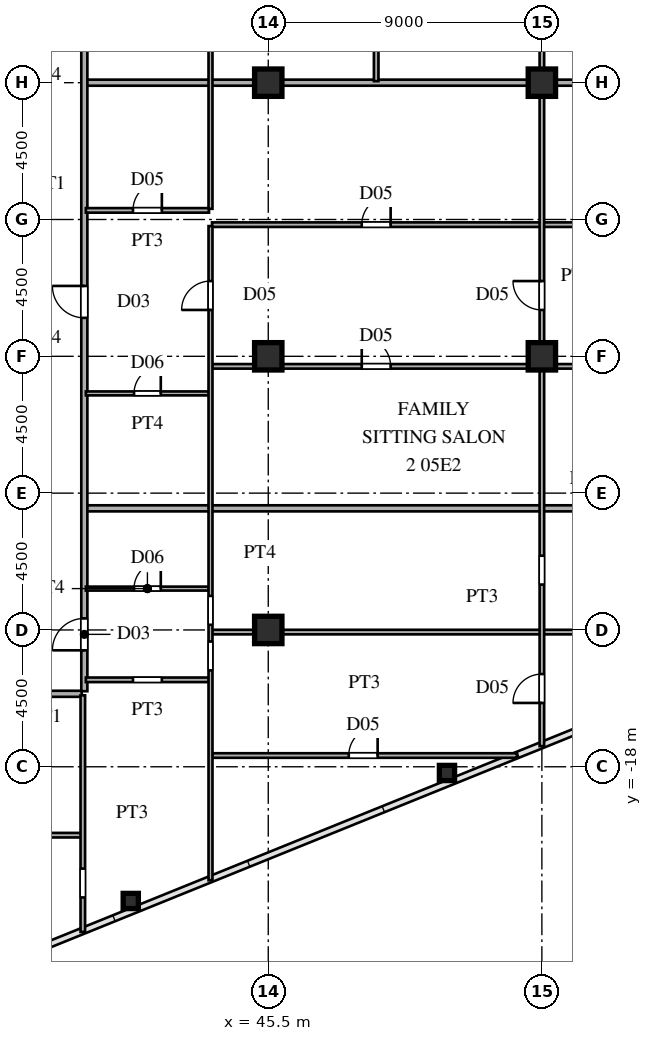
"""IFC4 building model, lengths in metres.
Left out: names, types, materials, properties, quantities, classifications, styles, units other than length and angle.
Written with IfcOpenShell. Run it as: python <this file> out.ifc"""

import sys

from ifc_helpers import new_model, si_unit, direction, frame, frame_2d, origin, origin_2d, place, context, subcontext, project, spatial, rectangle, hollow_rectangle, i_section, extrude, source, transform, mapped, element, fill, save


model = new_model("IFC4")
c1 = context("Model", 3, precision=1e-05, world=origin(), true_north=direction((0.0, 1.0)))
c2 = subcontext(c1, "Body", "Model", "MODEL_VIEW")
j1 = project(units=[si_unit("LENGTHUNIT", "METRE"), si_unit("PLANEANGLEUNIT", "RADIAN")], contexts=[c1])
p1 = place(None, origin())
s1 = spatial("IfcSite", under=j1, at=p1, CompositionType="ELEMENT")
p2 = place(p1, origin())
s2 = spatial("IfcBuilding", under=s1, at=p2, CompositionType="ELEMENT")
p3 = place(p2, frame((0.0, 0.0, 22.5)))
s3 = spatial("IfcBuildingStorey", under=s2, at=p3, CompositionType="ELEMENT", Elevation=22.5)
m1 = source(origin(), c2, "Body", "SweptSolid", [
    extrude(i_section(OverallWidth=0.9, OverallDepth=0.9, WebThickness=0.036, FlangeThickness=0.055, at=origin_2d()), origin(), (0.0, 0.0, 1.0), 3.6),
])
for number, where, z_axis, x_axis in (
    (1, (45.5, -13.5, 0.0), (0.0, 0.0, 1.0), (1.0, 0.0, 0.0)),
    (2, (45.5, -4.5, 0.0), (0.0, 0.0, 1.0), (1.0, 0.0, 0.0)),
    (3, (45.5, 4.5, 0.0), (0.0, 0.0, 1.0), (1.0, 0.0, 0.0)),
    (4, (54.5, -4.5, 0.0), (0.0, 0.0, 1.0), (1.0, 0.0, 0.0)),
    (5, (54.5, 4.5, 0.0), (0.0, 0.0, 1.0), (1.0, 0.0, 0.0)),
):
    element("IfcColumn", number, at=place(p3, frame(where, z_axis=z_axis, x_axis=x_axis)), inside=s3, PredefinedType="COLUMN", context=c2, shape_type="MappedRepresentation", body=[
        mapped(m1, transform((0.0, 0.0, 0.0), scale=1.0)),
    ])
m2 = source(origin(), c2, "Body", "SweptSolid", [
    extrude(hollow_rectangle(XDim=0.5, YDim=0.5, WallThickness=0.02, at=origin_2d()), origin(), (0.0, 0.0, 1.0), 3.6),
])
for number, where, z_axis, x_axis in (
    (6, (40.977, -22.414, 0.0), (0.0, 0.0, 1.0), (1.0, 0.0, 0.0)),
    (7, (51.378, -18.204, 0.0), (0.0, 0.0, 1.0), (1.0, 0.0, 0.0)),
):
    element("IfcColumn", number, at=place(p3, frame(where, z_axis=z_axis, x_axis=x_axis)), inside=s3, PredefinedType="COLUMN", context=c2, shape_type="MappedRepresentation", body=[
        mapped(m2, transform((0.0, 0.0, 0.0), scale=1.0)),
    ])
p4 = place(p3, frame((27.465, -20.25, 0.0), z_axis=(0.0, 0.0, 1.0), x_axis=(1.0, 0.0, 0.0)))
e8 = element("IfcWall", 8, at=p4, inside=s3, PredefinedType="PARTITIONING", context=c2, shape_type="SweptSolid", body=[
    extrude(rectangle(XDim=11.885, YDim=0.15, at=frame_2d((5.942, 0.0))), origin(), (0.0, 0.0, 1.0), 3.38),
])
p5 = place(p4, frame((5.51, 0.0, 0.0)))
e9 = element("IfcOpeningElement", 9, at=p5, cuts=e8, PredefinedType="OPENING", context=c2, shape_type="SweptSolid", body=[
    extrude(rectangle(XDim=0.95, YDim=2.15, at=frame_2d((0.475, 1.075))), frame((0.0, 0.085, 0.0), z_axis=(0.0, -1.0, 0.0), x_axis=(1.0, 0.0, 0.0)), (0.0, 0.0, 1.0), 0.17),
])
p6 = place(p3, frame((43.65, -17.63, 0.0), z_axis=(0.0, 0.0, 1.0), x_axis=(1.0, 0.0, 0.0)))
e10 = element("IfcWall", 10, at=p6, inside=s3, PredefinedType="PARTITIONING", context=c2, shape_type="SweptSolid", body=[
    extrude(rectangle(XDim=10.03, YDim=0.15, at=frame_2d((5.015, 0.0))), origin(), (0.0, 0.0, 1.0), 3.38),
])
p7 = place(p6, frame((4.498, 0.0, 0.0)))
e11 = element("IfcOpeningElement", 11, at=p7, cuts=e10, PredefinedType="OPENING", context=c2, shape_type="SweptSolid", body=[
    extrude(rectangle(XDim=0.95, YDim=2.15, at=frame_2d((0.475, 1.075))), frame((0.0, 0.085, 0.0), z_axis=(0.0, -1.0, 0.0), x_axis=(1.0, 0.0, 0.0)), (0.0, 0.0, 1.0), 0.17),
])
p8 = place(p3, frame((36.585, -15.6, 0.0), z_axis=(0.0, 0.0, 1.0), x_axis=(1.0, 0.0, 0.0)))
e12 = element("IfcWall", 12, at=p8, inside=s3, PredefinedType="PARTITIONING", context=c2, shape_type="SweptSolid", body=[
    extrude(rectangle(XDim=2.78, YDim=0.2, at=frame_2d((1.39, 0.0))), origin(), (0.0, 0.0, 1.0), 3.38),
])
p9 = place(p3, frame((39.5, -15.14, 0.0), z_axis=(0.0, 0.0, 1.0), x_axis=(1.0, 0.0, 0.0)))
e13 = element("IfcWall", 13, at=p9, inside=s3, PredefinedType="PARTITIONING", context=c2, shape_type="SweptSolid", body=[
    extrude(rectangle(XDim=4.05, YDim=0.15, at=frame_2d((2.025, 0.0))), origin(), (0.0, 0.0, 1.0), 3.38),
])
p10 = place(p9, frame((1.55, 0.0, 0.0)))
e14 = element("IfcOpeningElement", 14, at=p10, cuts=e13, PredefinedType="OPENING", context=c2, shape_type="SweptSolid", body=[
    extrude(rectangle(XDim=0.95, YDim=2.15, at=frame_2d((0.475, 1.075))), frame((0.0, 0.085, 0.0), z_axis=(0.0, -1.0, 0.0), x_axis=(1.0, 0.0, 0.0)), (0.0, 0.0, 1.0), 0.17),
])
p11 = place(p3, frame((43.65, -13.57, 0.0), z_axis=(0.0, 0.0, 1.0), x_axis=(1.0, 0.0, 0.0)))
e15 = element("IfcWall", 15, at=p11, inside=s3, PredefinedType="PARTITIONING", context=c2, shape_type="SweptSolid", body=[
    extrude(rectangle(XDim=20.075, YDim=0.15, at=frame_2d((10.038, 0.0))), origin(), (0.0, 0.0, 1.0), 2.68),
])
p12 = place(p3, frame((39.5, -12.14, 0.0), z_axis=(0.0, 0.0, 1.0), x_axis=(1.0, 0.0, 0.0)))
e16 = element("IfcWall", 16, at=p12, inside=s3, PredefinedType="PARTITIONING", context=c2, shape_type="SweptSolid", body=[
    extrude(rectangle(XDim=4.05, YDim=0.13, at=frame_2d((2.025, 0.0))), origin(), (0.0, 0.0, 1.0), 3.38),
])
p13 = place(p12, frame((1.585, 0.0, 0.0)))
e17 = element("IfcOpeningElement", 17, at=p13, cuts=e16, PredefinedType="OPENING", context=c2, shape_type="SweptSolid", body=[
    extrude(rectangle(XDim=0.88, YDim=2.1, at=frame_2d((0.44, 1.05))), frame((0.0, 0.075, 0.0), z_axis=(0.0, -1.0, 0.0), x_axis=(1.0, 0.0, 0.0)), (0.0, 0.0, 1.0), 0.15),
])
p14 = place(p3, frame((39.53, -9.5, 0.0), z_axis=(0.0, 0.0, 1.0), x_axis=(1.0, 0.0, 0.0)))
e18 = element("IfcWall", 18, at=p14, inside=s3, PredefinedType="PARTITIONING", context=c2, shape_type="SweptSolid", body=[
    extrude(rectangle(XDim=32.845, YDim=0.2, at=frame_2d((16.422, 0.0))), origin(), (0.0, 0.0, 1.0), 3.38),
])
p15 = place(p3, frame((39.5, -5.72, 0.0), z_axis=(0.0, 0.0, 1.0), x_axis=(1.0, 0.0, 0.0)))
e19 = element("IfcWall", 19, at=p15, inside=s3, PredefinedType="PARTITIONING", context=c2, shape_type="SweptSolid", body=[
    extrude(rectangle(XDim=4.05, YDim=0.13, at=frame_2d((2.025, 0.0))), origin(), (0.0, 0.0, 1.0), 3.38),
])
p16 = place(p15, frame((1.585, 0.0, 0.0)))
e20 = element("IfcOpeningElement", 20, at=p16, cuts=e19, PredefinedType="OPENING", context=c2, shape_type="SweptSolid", body=[
    extrude(rectangle(XDim=0.88, YDim=2.1, at=frame_2d((0.44, 1.05))), frame((0.0, 0.075, 0.0), z_axis=(0.0, -1.0, 0.0), x_axis=(1.0, 0.0, 0.0)), (0.0, 0.0, 1.0), 0.15),
])
p17 = place(p3, frame((43.65, -4.83, 0.0), z_axis=(0.0, 0.0, 1.0), x_axis=(1.0, 0.0, 0.0)))
e21 = element("IfcWall", 21, at=p17, inside=s3, PredefinedType="PARTITIONING", context=c2, shape_type="SweptSolid", body=[
    extrude(rectangle(XDim=28.885, YDim=0.15, at=frame_2d((14.442, 0.0))), origin(), (0.0, 0.0, 1.0), 3.38),
])
p18 = place(p17, frame((4.925, 0.0, 0.0)))
e22 = element("IfcOpeningElement", 22, at=p18, cuts=e21, PredefinedType="OPENING", context=c2, shape_type="SweptSolid", body=[
    extrude(rectangle(XDim=0.95, YDim=2.15, at=frame_2d((0.475, 1.075))), frame((0.0, 0.085, 0.0), z_axis=(0.0, -1.0, 0.0), x_axis=(1.0, 0.0, 0.0)), (0.0, 0.0, 1.0), 0.17),
])
p19 = place(p17, frame((13.225, 0.0, 0.0)))
e23 = element("IfcOpeningElement", 23, at=p19, cuts=e21, PredefinedType="OPENING", context=c2, shape_type="SweptSolid", body=[
    extrude(rectangle(XDim=0.95, YDim=2.15, at=frame_2d((0.475, 1.075))), frame((0.0, 0.085, 0.0), z_axis=(0.0, -1.0, 0.0), x_axis=(1.0, 0.0, 0.0)), (0.0, 0.0, 1.0), 0.17),
])
p20 = place(p3, frame((43.65, -0.17, 0.0), z_axis=(0.0, 0.0, 1.0), x_axis=(1.0, 0.0, 0.0)))
e24 = element("IfcWall", 24, at=p20, inside=s3, PredefinedType="PARTITIONING", context=c2, shape_type="SweptSolid", body=[
    extrude(rectangle(XDim=28.885, YDim=0.15, at=frame_2d((14.442, 0.0))), origin(), (0.0, 0.0, 1.0), 3.38),
])
p21 = place(p20, frame((4.925, 0.0, 0.0)))
e25 = element("IfcOpeningElement", 25, at=p21, cuts=e24, PredefinedType="OPENING", context=c2, shape_type="SweptSolid", body=[
    extrude(rectangle(XDim=0.95, YDim=2.15, at=frame_2d((0.475, 1.075))), frame((0.0, 0.085, 0.0), z_axis=(0.0, -1.0, 0.0), x_axis=(1.0, 0.0, 0.0)), (0.0, 0.0, 1.0), 0.17),
])
p22 = place(p20, frame((13.225, 0.0, 0.0)))
e26 = element("IfcOpeningElement", 26, at=p22, cuts=e24, PredefinedType="OPENING", context=c2, shape_type="SweptSolid", body=[
    extrude(rectangle(XDim=0.95, YDim=2.15, at=frame_2d((0.475, 1.075))), frame((0.0, 0.085, 0.0), z_axis=(0.0, -1.0, 0.0), x_axis=(1.0, 0.0, 0.0)), (0.0, 0.0, 1.0), 0.17),
])
p23 = place(p3, frame((39.5, 0.3, 0.0), z_axis=(0.0, 0.0, 1.0), x_axis=(1.0, 0.0, 0.0)))
e27 = element("IfcWall", 27, at=p23, inside=s3, PredefinedType="PARTITIONING", context=c2, shape_type="SweptSolid", body=[
    extrude(rectangle(XDim=4.05, YDim=0.15, at=frame_2d((2.025, 0.0))), origin(), (0.0, 0.0, 1.0), 3.38),
])
p24 = place(p23, frame((1.55, 0.0, 0.0)))
e28 = element("IfcOpeningElement", 28, at=p24, cuts=e27, PredefinedType="OPENING", context=c2, shape_type="SweptSolid", body=[
    extrude(rectangle(XDim=0.95, YDim=2.15, at=frame_2d((0.475, 1.075))), frame((0.0, 0.085, 0.0), z_axis=(0.0, -1.0, 0.0), x_axis=(1.0, 0.0, 0.0)), (0.0, 0.0, 1.0), 0.17),
])
p25 = place(p3, frame((39.53, 4.5, 0.0), z_axis=(0.0, 0.0, 1.0), x_axis=(1.0, 0.0, 0.0)))
e29 = element("IfcWall", 29, at=p25, inside=s3, PredefinedType="PARTITIONING", context=c2, shape_type="SweptSolid", body=[
    extrude(rectangle(XDim=14.99, YDim=0.2, at=frame_2d((7.495, 0.0))), origin(), (0.0, 0.0, 1.0), 2.68),
])
p26 = place(p3, frame((54.52, 4.5, 0.0), z_axis=(0.0, 0.0, 1.0), x_axis=(1.0, 0.0, 0.0)))
e30 = element("IfcWall", 30, at=p26, inside=s3, PredefinedType="PARTITIONING", context=c2, shape_type="SweptSolid", body=[
    extrude(rectangle(XDim=17.985, YDim=0.2, at=frame_2d((8.992, 0.0))), origin(), (0.0, 0.0, 1.0), 3.38),
])
p27 = place(p3, frame((39.4, -23.433, 0.0), z_axis=(0.0, 0.0, 1.0), x_axis=(0.0, 1.0, 0.0)))
e31 = element("IfcWall", 31, at=p27, inside=s3, PredefinedType="PARTITIONING", context=c2, shape_type="SweptSolid", body=[
    extrude(rectangle(XDim=7.783, YDim=0.15, at=frame_2d((3.892, 0.0))), origin(), (0.0, 0.0, 1.0), 3.38),
])
p28 = place(p27, frame((1.134, 0.0, 0.0)))
e32 = element("IfcOpeningElement", 32, at=p28, cuts=e31, PredefinedType="OPENING", context=c2, shape_type="SweptSolid", body=[
    extrude(rectangle(XDim=0.95, YDim=2.15, at=frame_2d((0.475, 1.075))), frame((0.0, 0.085, 0.0), z_axis=(0.0, -1.0, 0.0), x_axis=(1.0, 0.0, 0.0)), (0.0, 0.0, 1.0), 0.17),
])
p29 = place(p3, frame((39.45, -15.515, 0.0), z_axis=(0.0, 0.0, 1.0), x_axis=(0.0, 1.0, 0.0)))
e33 = element("IfcWall", 33, at=p29, inside=s3, PredefinedType="PARTITIONING", context=c2, shape_type="SweptSolid", body=[
    extrude(rectangle(XDim=31.03, YDim=0.2, at=frame_2d((15.515, 0.0))), origin(), (0.0, 0.0, 1.0), 3.38),
])
p30 = place(p29, frame((1.345, 0.0, 0.0)))
e34 = element("IfcOpeningElement", 34, at=p30, cuts=e33, PredefinedType="OPENING", context=c2, shape_type="SweptSolid", body=[
    extrude(rectangle(XDim=1.05, YDim=2.25, at=frame_2d((0.525, 1.125))), frame((0.0, 0.11, 0.0), z_axis=(0.0, -1.0, 0.0), x_axis=(1.0, 0.0, 0.0)), (0.0, 0.0, 1.0), 0.22),
])
p31 = place(p29, frame((12.28, 0.0, 0.0)))
e35 = element("IfcOpeningElement", 35, at=p31, cuts=e33, PredefinedType="OPENING", context=c2, shape_type="SweptSolid", body=[
    extrude(rectangle(XDim=1.05, YDim=2.25, at=frame_2d((0.525, 1.125))), frame((0.0, 0.11, 0.0), z_axis=(0.0, -1.0, 0.0), x_axis=(1.0, 0.0, 0.0)), (0.0, 0.0, 1.0), 0.22),
])
p32 = place(p29, frame((25.067, 0.0, 0.0)))
e36 = element("IfcOpeningElement", 36, at=p32, cuts=e33, PredefinedType="OPENING", context=c2, shape_type="SweptSolid", body=[
    extrude(rectangle(XDim=1.05, YDim=2.25, at=frame_2d((0.525, 1.125))), frame((0.0, 0.11, 0.0), z_axis=(0.0, -1.0, 0.0), x_axis=(1.0, 0.0, 0.0)), (0.0, 0.0, 1.0), 0.22),
])
p33 = place(p3, frame((43.6, -21.733, 0.0), z_axis=(0.0, 0.0, 1.0), x_axis=(0.0, 1.0, 0.0)))
e37 = element("IfcWall", 37, at=p33, inside=s3, PredefinedType="PARTITIONING", context=c2, shape_type="SweptSolid", body=[
    extrude(rectangle(XDim=21.516, YDim=0.13, at=frame_2d((10.758, 0.0))), origin(), (0.0, 0.0, 1.0), 3.38),
])
p34 = place(p33, frame((6.903, 0.0, 0.0)))
e38 = element("IfcOpeningElement", 38, at=p34, cuts=e37, PredefinedType="OPENING", context=c2, shape_type="SweptSolid", body=[
    extrude(rectangle(XDim=0.95, YDim=2.15, at=frame_2d((0.475, 1.075))), frame((0.0, 0.075, 0.0), z_axis=(0.0, -1.0, 0.0), x_axis=(1.0, 0.0, 0.0)), (0.0, 0.0, 1.0), 0.15),
])
p35 = place(p33, frame((8.403, 0.0, 0.0)))
e39 = element("IfcOpeningElement", 39, at=p35, cuts=e37, PredefinedType="OPENING", context=c2, shape_type="SweptSolid", body=[
    extrude(rectangle(XDim=0.95, YDim=2.15, at=frame_2d((0.475, 1.075))), frame((0.0, 0.075, 0.0), z_axis=(0.0, -1.0, 0.0), x_axis=(1.0, 0.0, 0.0)), (0.0, 0.0, 1.0), 0.15),
])
p36 = place(p33, frame((18.758, 0.0, 0.0)))
e40 = element("IfcOpeningElement", 40, at=p36, cuts=e37, PredefinedType="OPENING", context=c2, shape_type="SweptSolid", body=[
    extrude(rectangle(XDim=0.95, YDim=2.15, at=frame_2d((0.475, 1.075))), frame((0.0, 0.075, 0.0), z_axis=(0.0, -1.0, 0.0), x_axis=(1.0, 0.0, 0.0)), (0.0, 0.0, 1.0), 0.15),
])
p37 = place(p3, frame((43.6, 0.352, 0.0), z_axis=(0.0, 0.0, 1.0), x_axis=(0.0, 1.0, 0.0)))
e41 = element("IfcWall", 41, at=p37, inside=s3, PredefinedType="PARTITIONING", context=c2, shape_type="SweptSolid", body=[
    extrude(rectangle(XDim=21.381, YDim=0.13, at=frame_2d((10.69, 0.0))), origin(), (0.0, 0.0, 1.0), 3.38),
])
p38 = place(p37, frame((8.578, 0.0, 0.0)))
e42 = element("IfcOpeningElement", 42, at=p38, cuts=e41, PredefinedType="OPENING", context=c2, shape_type="SweptSolid", body=[
    extrude(rectangle(XDim=0.95, YDim=2.15, at=frame_2d((0.475, 1.075))), frame((0.0, 0.075, 0.0), z_axis=(0.0, -1.0, 0.0), x_axis=(1.0, 0.0, 0.0)), (0.0, 0.0, 1.0), 0.15),
])
p39 = place(p37, frame((10.078, 0.0, 0.0)))
e43 = element("IfcOpeningElement", 43, at=p39, cuts=e41, PredefinedType="OPENING", context=c2, shape_type="SweptSolid", body=[
    extrude(rectangle(XDim=0.95, YDim=2.15, at=frame_2d((0.475, 1.075))), frame((0.0, 0.075, 0.0), z_axis=(0.0, -1.0, 0.0), x_axis=(1.0, 0.0, 0.0)), (0.0, 0.0, 1.0), 0.15),
])
p40 = place(p3, frame((49.05, 4.55, 0.0), z_axis=(0.0, 0.0, 1.0), x_axis=(0.0, 1.0, 0.0)))
e44 = element("IfcWall", 44, at=p40, inside=s3, PredefinedType="PARTITIONING", context=c2, shape_type="SweptSolid", body=[
    extrude(rectangle(XDim=11.365, YDim=0.15, at=frame_2d((5.683, 0.0))), origin(), (0.0, 0.0, 1.0), 3.38),
])
p41 = place(p40, frame((2.341, 0.0, 0.0)))
e45 = element("IfcOpeningElement", 45, at=p41, cuts=e44, PredefinedType="OPENING", context=c2, shape_type="SweptSolid", body=[
    extrude(rectangle(XDim=0.95, YDim=2.15, at=frame_2d((0.475, 1.075))), frame((0.0, 0.085, 0.0), z_axis=(0.0, -1.0, 0.0), x_axis=(1.0, 0.0, 0.0)), (0.0, 0.0, 1.0), 0.17),
])
p42 = place(p3, frame((54.5, -17.321, 0.0), z_axis=(0.0, 0.0, 1.0), x_axis=(0.0, 1.0, 0.0)))
e46 = element("IfcWall", 46, at=p42, inside=s3, PredefinedType="PARTITIONING", context=c2, shape_type="SweptSolid", body=[
    extrude(rectangle(XDim=33.236, YDim=0.15, at=frame_2d((16.618, 0.0))), origin(), (0.0, 0.0, 1.0), 2.68),
])
p43 = place(p42, frame((1.42, 0.0, 0.0)))
e47 = element("IfcOpeningElement", 47, at=p43, cuts=e46, PredefinedType="OPENING", context=c2, shape_type="SweptSolid", body=[
    extrude(rectangle(XDim=0.95, YDim=2.15, at=frame_2d((0.475, 1.075))), frame((0.0, 0.085, 0.0), z_axis=(0.0, -1.0, 0.0), x_axis=(1.0, 0.0, 0.0)), (0.0, 0.0, 1.0), 0.17),
])
p44 = place(p42, frame((5.313, 0.0, 0.0)))
e48 = element("IfcOpeningElement", 48, at=p44, cuts=e46, PredefinedType="OPENING", context=c2, shape_type="SweptSolid", body=[
    extrude(rectangle(XDim=0.95, YDim=2.15, at=frame_2d((0.475, 1.075))), frame((0.0, 0.085, 0.0), z_axis=(0.0, -1.0, 0.0), x_axis=(1.0, 0.0, 0.0)), (0.0, 0.0, 1.0), 0.17),
])
p45 = place(p42, frame((14.346, 0.0, 0.0)))
e49 = element("IfcOpeningElement", 49, at=p45, cuts=e46, PredefinedType="OPENING", context=c2, shape_type="SweptSolid", body=[
    extrude(rectangle(XDim=0.95, YDim=2.15, at=frame_2d((0.475, 1.075))), frame((0.0, 0.085, 0.0), z_axis=(0.0, -1.0, 0.0), x_axis=(1.0, 0.0, 0.0)), (0.0, 0.0, 1.0), 0.17),
])
p46 = place(p42, frame((24.212, 0.0, 0.0)))
e50 = element("IfcOpeningElement", 50, at=p46, cuts=e46, PredefinedType="OPENING", context=c2, shape_type="SweptSolid", body=[
    extrude(rectangle(XDim=0.95, YDim=2.15, at=frame_2d((0.475, 1.075))), frame((0.0, 0.085, 0.0), z_axis=(0.0, -1.0, 0.0), x_axis=(1.0, 0.0, 0.0)), (0.0, 0.0, 1.0), 0.17),
])
m3 = source(origin(), c2, "Body", "SweptSolid", [
    extrude(rectangle(XDim=0.95, YDim=2.15, at=frame_2d((0.475, 1.075))), frame((0.0, 0.025, 0.0), z_axis=(0.0, -1.0, 0.0), x_axis=(1.0, 0.0, 0.0)), (0.0, 0.0, 1.0), 0.05),
])
p47 = place(p7, origin())
e51 = element("IfcDoor", 51, at=p47, inside=s3, OperationType="SINGLE_SWING_RIGHT", PredefinedType="DOOR", context=c2, shape_type="MappedRepresentation", body=[
    mapped(m3, transform((0.0, 0.0, 0.0), scale=1.0)),
])
fill(e11, e51)
m4 = source(origin(), c2, "Body", "SweptSolid", [
    extrude(rectangle(XDim=0.88, YDim=2.1, at=frame_2d((0.44, 1.05))), frame((0.0, 0.025, 0.0), z_axis=(0.0, -1.0, 0.0), x_axis=(1.0, 0.0, 0.0)), (0.0, 0.0, 1.0), 0.05),
])
p48 = place(p13, origin())
e52 = element("IfcDoor", 52, at=p48, inside=s3, OperationType="SINGLE_SWING_RIGHT", PredefinedType="DOOR", context=c2, shape_type="MappedRepresentation", body=[
    mapped(m4, transform((0.0, 0.0, 0.0), scale=1.0)),
])
fill(e17, e52)
p49 = place(p16, origin())
e53 = element("IfcDoor", 53, at=p49, inside=s3, OperationType="SINGLE_SWING_RIGHT", PredefinedType="DOOR", context=c2, shape_type="MappedRepresentation", body=[
    mapped(m4, transform((0.0, 0.0, 0.0), scale=1.0)),
])
fill(e20, e53)
p50 = place(p18, origin())
e54 = element("IfcDoor", 54, at=p50, inside=s3, OperationType="SINGLE_SWING_LEFT", PredefinedType="DOOR", context=c2, shape_type="MappedRepresentation", body=[
    mapped(m3, transform((0.0, 0.0, 0.0), scale=1.0)),
])
fill(e22, e54)
p51 = place(p21, origin())
e55 = element("IfcDoor", 55, at=p51, inside=s3, OperationType="SINGLE_SWING_RIGHT", PredefinedType="DOOR", context=c2, shape_type="MappedRepresentation", body=[
    mapped(m3, transform((0.0, 0.0, 0.0), scale=1.0)),
])
fill(e25, e55)
p52 = place(p24, origin())
e56 = element("IfcDoor", 56, at=p52, inside=s3, OperationType="SINGLE_SWING_RIGHT", PredefinedType="DOOR", context=c2, shape_type="MappedRepresentation", body=[
    mapped(m3, transform((0.0, 0.0, 0.0), scale=1.0)),
])
fill(e28, e56)
m5 = source(origin(), c2, "Body", "SweptSolid", [
    extrude(rectangle(XDim=1.05, YDim=2.25, at=frame_2d((0.525, 1.125))), frame((0.0, 0.025, 0.0), z_axis=(0.0, -1.0, 0.0), x_axis=(1.0, 0.0, 0.0)), (0.0, 0.0, 1.0), 0.05),
])
p53 = place(p30, origin())
e57 = element("IfcDoor", 57, at=p53, inside=s3, OperationType="SINGLE_SWING_LEFT", PredefinedType="DOOR", context=c2, shape_type="MappedRepresentation", body=[
    mapped(m5, transform((0.0, 0.0, 0.0), scale=1.0)),
])
fill(e34, e57)
p54 = place(p31, origin())
e58 = element("IfcDoor", 58, at=p54, inside=s3, OperationType="SINGLE_SWING_RIGHT", PredefinedType="DOOR", context=c2, shape_type="MappedRepresentation", body=[
    mapped(m5, transform((0.0, 0.0, 0.0), scale=1.0)),
])
fill(e35, e58)
p55 = place(p36, origin())
e59 = element("IfcDoor", 59, at=p55, inside=s3, OperationType="SINGLE_SWING_LEFT", PredefinedType="DOOR", context=c2, shape_type="MappedRepresentation", body=[
    mapped(m3, transform((0.0, 0.0, 0.0), scale=1.0)),
])
fill(e40, e59)
p56 = place(p43, origin())
e60 = element("IfcDoor", 60, at=p56, inside=s3, OperationType="SINGLE_SWING_LEFT", PredefinedType="DOOR", context=c2, shape_type="MappedRepresentation", body=[
    mapped(m3, transform((0.0, 0.0, 0.0), scale=1.0)),
])
fill(e47, e60)
p57 = place(p45, origin())
e61 = element("IfcDoor", 61, at=p57, inside=s3, OperationType="SINGLE_SWING_RIGHT", PredefinedType="DOOR", context=c2, shape_type="MappedRepresentation", body=[
    mapped(m3, transform((0.0, 0.0, 0.0), scale=1.0)),
])
fill(e49, e61)
save(model, sys.argv[1])
